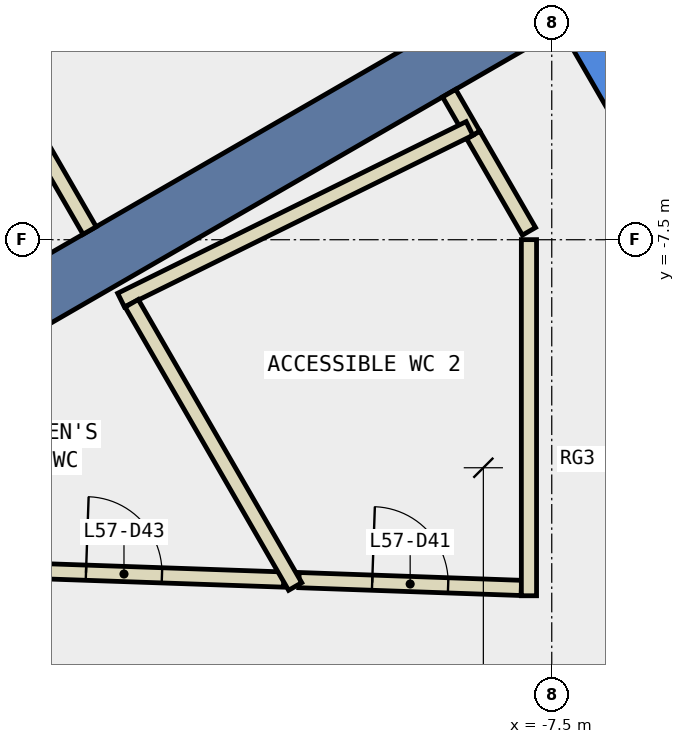
"""IFC4 building model, lengths in metres.
Left out: names, types, materials, properties, quantities, classifications, styles, units other than length and angle.
Written with IfcOpenShell. Run it as: python <this file> out.ifc"""

import sys

from ifc_helpers import new_model, si_unit, direction, frame, frame_2d, origin, place, context, subcontext, project, spatial, polyline, rectangle, outline, extrude, element, fill, save


model = new_model("IFC4")
c1 = context("Model", 3, precision=1e-05, world=origin(), true_north=direction((0.0, 1.0)))
c2 = subcontext(c1, "Body", "Model", "MODEL_VIEW")
j1 = project(units=[si_unit("LENGTHUNIT", "METRE"), si_unit("PLANEANGLEUNIT", "RADIAN")], contexts=[c1])
p1 = place(None, origin())
s1 = spatial("IfcSite", under=j1, at=p1, CompositionType="ELEMENT")
p2 = place(p1, origin())
s2 = spatial("IfcBuilding", under=s1, at=p2, CompositionType="ELEMENT")
p3 = place(p2, frame((0.0, 0.0, 252.2)))
s3 = spatial("IfcBuildingStorey", under=s2, at=p3, CompositionType="ELEMENT", Elevation=252.2)
p4 = place(p3, frame((0.0, 0.0, -0.34)))
e1 = element("IfcWall", 1, at=p4, inside=s3, PredefinedType="SHEAR", context=c2, shape_type="SweptSolid", body=[
    extrude(outline(polyline([(-11.547, 2.5), (-5.774, -7.5), (-5.427, -6.9), (-10.854, 2.5), (-11.547, 2.5)])), origin(), (0.0, 0.0, 1.0), 3.6),
])
p5 = place(p3, frame((-7.578, -4.375, -0.34), z_axis=(0.0, 0.0, 1.0), x_axis=(-0.866024315419, -0.5000018851, 0.0)))
e2 = element("IfcWall", 2, at=p5, inside=s3, PredefinedType="SHEAR", context=c2, shape_type="SweptSolid", body=[
    extrude(rectangle(XDim=9.0, YDim=0.8, at=frame_2d((4.5, 0.0))), origin(), (0.0, 0.0, 1.0), 3.6),
])
p6 = place(p3, frame((-8.532, -6.123, 0.0), z_axis=(0.0, 0.0, 1.0), x_axis=(-0.499977104415, 0.866038622153, 0.0)))
e3 = element("IfcWall", 3, at=p6, inside=s3, PredefinedType="PARTITIONING", context=c2, shape_type="SweptSolid", body=[
    extrude(rectangle(XDim=0.636, YDim=0.2, at=frame_2d((0.318, 0.0))), origin(), (0.0, 0.0, 1.0), 3.26),
])
p7 = place(p3, frame((-7.8, -7.39, 0.0), z_axis=(0.0, 0.0, 1.0), x_axis=(-0.500266477503, 0.865871498253, 0.0)))
e4 = element("IfcWall", 4, at=p7, inside=s3, PredefinedType="PARTITIONING", context=c2, shape_type="SweptSolid", body=[
    extrude(rectangle(XDim=1.463, YDim=0.2, at=frame_2d((0.731, 0.0))), origin(), (0.0, 0.0, 1.0), 3.26),
])
p8 = place(p3, frame((-10.826, -11.978, 0.0), z_axis=(0.0, 0.0, 1.0), x_axis=(0.999380679818, -0.035188873332, 0.0)))
e5 = element("IfcWall", 5, at=p8, inside=s3, PredefinedType="PARTITIONING", context=c2, shape_type="SweptSolid", body=[
    extrude(rectangle(XDim=2.928, YDim=0.2, at=frame_2d((1.464, 0.0))), origin(), (0.0, 0.0, 1.0), 3.26),
])
p9 = place(p8, frame((0.964, 0.0, 0.0)))
e6 = element("IfcOpeningElement", 6, at=p9, cuts=e5, PredefinedType="OPENING", context=c2, shape_type="SweptSolid", body=[
    extrude(rectangle(XDim=1.0, YDim=2.1, at=frame_2d((0.5, 1.05))), frame((0.0, 0.11, 0.0), z_axis=(0.0, -1.0, 0.0), x_axis=(1.0, 0.0, 0.0)), (0.0, 0.0, 1.0), 0.22),
])
p10 = place(p3, frame((-15.23, -11.825, 0.0), z_axis=(0.0, 0.0, 1.0), x_axis=(0.999397560436, -0.0347061406, 0.0)))
e7 = element("IfcWall", 7, at=p10, inside=s3, PredefinedType="PARTITIONING", context=c2, shape_type="SweptSolid", body=[
    extrude(rectangle(XDim=4.207, YDim=0.2, at=frame_2d((2.103, 0.0))), origin(), (0.0, 0.0, 1.0), 3.26),
])
p11 = place(p10, frame((1.603, 0.0, 0.0)))
e8 = element("IfcOpeningElement", 8, at=p11, cuts=e7, PredefinedType="OPENING", context=c2, shape_type="SweptSolid", body=[
    extrude(rectangle(XDim=1.0, YDim=2.1, at=frame_2d((0.5, 1.05))), frame((0.0, 0.11, 0.0), z_axis=(0.0, -1.0, 0.0), x_axis=(1.0, 0.0, 0.0)), (0.0, 0.0, 1.0), 0.22),
])
p12 = place(p3, frame((-7.8, -12.184, 0.0), z_axis=(0.0, 0.0, 1.0), x_axis=(0.0, 1.0, 0.0)))
e9 = element("IfcWall", 9, at=p12, inside=s3, PredefinedType="PARTITIONING", context=c2, shape_type="SweptSolid", body=[
    extrude(rectangle(XDim=4.685, YDim=0.2, at=frame_2d((2.343, 0.0))), origin(), (0.0, 0.0, 1.0), 3.26),
])
p13 = place(p3, frame((-8.582, -6.036, 0.0), z_axis=(0.0, 0.0, 1.0), x_axis=(-0.897105141673, -0.441817116897, 0.0)))
e10 = element("IfcWall", 10, at=p13, inside=s3, PredefinedType="PARTITIONING", context=c2, shape_type="SweptSolid", body=[
    extrude(rectangle(XDim=5.111, YDim=0.2, at=frame_2d((2.555, 0.0))), origin(), (0.0, 0.0, 1.0), 3.26),
])
p14 = place(p3, frame((-13.58, -7.379, 0.0), z_axis=(0.0, 0.0, 1.0), x_axis=(-0.499916403993, 0.866073662582, 0.0)))
e11 = element("IfcWall", 11, at=p14, inside=s3, PredefinedType="PARTITIONING", context=c2, shape_type="SweptSolid", body=[
    extrude(rectangle(XDim=4.359, YDim=0.2, at=frame_2d((2.179, 0.0))), origin(), (0.0, 0.0, 1.0), 3.26),
])
p15 = place(p3, frame((-10.876, -12.062, 0.0), z_axis=(0.0, 0.0, 1.0), x_axis=(-0.499977877545, 0.866038175813, 0.0)))
e12 = element("IfcWall", 12, at=p15, inside=s3, PredefinedType="PARTITIONING", context=c2, shape_type="SweptSolid", body=[
    extrude(rectangle(XDim=4.302, YDim=0.2, at=frame_2d((2.151, 0.0))), origin(), (0.0, 0.0, 1.0), 3.26),
])
p16 = place(p9, origin())
e13 = element("IfcDoor", 13, at=p16, inside=s3, OperationType="SINGLE_SWING_LEFT", PredefinedType="DOOR", context=c2, shape_type="SweptSolid", body=[
    extrude(rectangle(XDim=1.0, YDim=2.1, at=frame_2d((0.5, 1.05))), frame((0.0, 0.025, 0.0), z_axis=(0.0, -1.0, 0.0), x_axis=(1.0, 0.0, 0.0)), (0.0, 0.0, 1.0), 0.05),
])
fill(e6, e13)
p17 = place(p11, origin())
e14 = element("IfcDoor", 14, at=p17, inside=s3, OperationType="SINGLE_SWING_LEFT", PredefinedType="DOOR", context=c2, shape_type="SweptSolid", body=[
    extrude(rectangle(XDim=1.0, YDim=2.1, at=frame_2d((0.5, 1.05))), frame((0.0, 0.025, 0.0), z_axis=(0.0, -1.0, 0.0), x_axis=(1.0, 0.0, 0.0)), (0.0, 0.0, 1.0), 0.05),
])
fill(e8, e14)
save(model, sys.argv[1])
